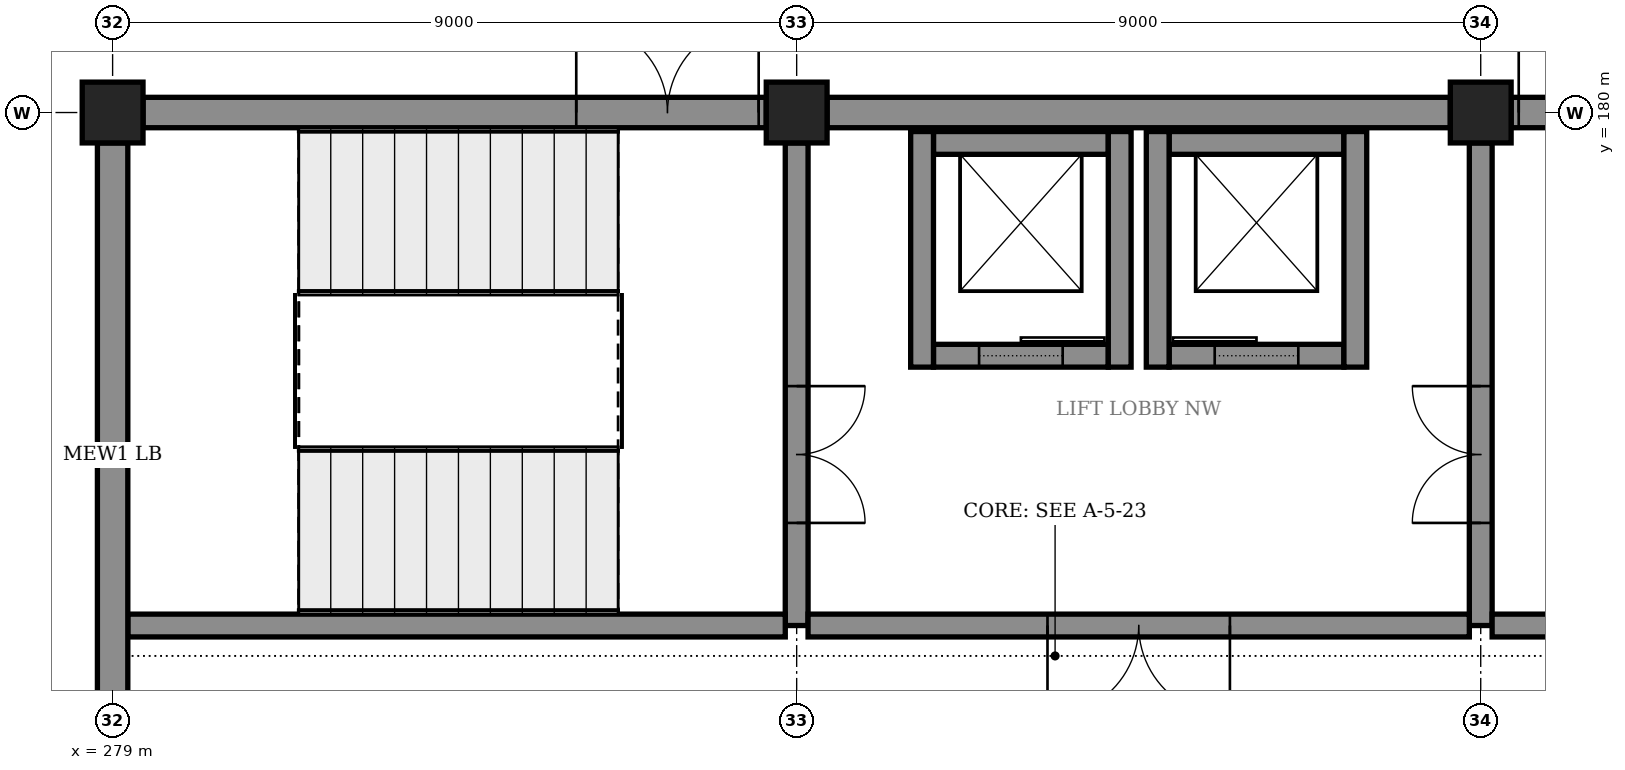
"""IFC4 building model, lengths in metres.
Left out: names, types, materials, properties, quantities, classifications, styles, units other than length and angle.
Written with IfcOpenShell. Run it as: python <this file> out.ifc"""

import sys

from ifc_helpers import new_model, si_unit, direction, frame, frame_2d, origin, origin_2d, place, context, subcontext, project, spatial, rectangle, extrude, element, fill, save


model = new_model("IFC4")
c1 = context("Model", 3, precision=1e-05, world=origin(), true_north=direction((0.0, 1.0)))
c2 = subcontext(c1, "Body", "Model", "MODEL_VIEW")
j1 = project(units=[si_unit("LENGTHUNIT", "METRE"), si_unit("PLANEANGLEUNIT", "RADIAN")], contexts=[c1])
p1 = place(None, origin())
s1 = spatial("IfcSite", under=j1, at=p1, CompositionType="ELEMENT")
p2 = place(p1, origin())
s2 = spatial("IfcBuilding", under=s1, at=p2, CompositionType="ELEMENT")
p3 = place(p2, origin())
s3 = spatial("IfcBuildingStorey", under=s2, at=p3, CompositionType="ELEMENT", Elevation=0.0)
for number, where, z_axis, x_axis in (
    (1, (279.0, 180.0, -0.3), (0.0, 0.0, 1.0), (1.0, 0.0, 0.0)),
    (2, (288.0, 180.0, -0.3), (0.0, 0.0, 1.0), (1.0, 0.0, 0.0)),
    (3, (297.0, 180.0, -0.3), (0.0, 0.0, 1.0), (1.0, 0.0, 0.0)),
):
    element("IfcColumn", number, at=place(p3, frame(where, z_axis=z_axis, x_axis=x_axis)), inside=s3, PredefinedType="COLUMN", context=c2, shape_type="SweptSolid", body=[
        extrude(rectangle(XDim=0.8, YDim=0.8, at=origin_2d()), origin(), (0.0, 0.0, 1.0), 6.3),
    ])
p4 = place(p3, frame((279.4, 180.0, 0.0), z_axis=(0.0, 0.0, 1.0), x_axis=(1.0, 0.0, 0.0)))
e4 = element("IfcWall", 4, at=p4, inside=s3, PredefinedType="STANDARD", context=c2, shape_type="SweptSolid", body=[
    extrude(rectangle(XDim=8.2, YDim=0.4, at=frame_2d((4.1, 0.0))), origin(), (0.0, 0.0, 1.0), 4.82),
])
p5 = place(p4, frame((5.7, 0.0, 0.0)))
e5 = element("IfcOpeningElement", 5, at=p5, cuts=e4, PredefinedType="OPENING", context=c2, shape_type="SweptSolid", body=[
    extrude(rectangle(XDim=2.4, YDim=2.4, at=frame_2d((1.2, 1.2))), frame((0.0, 0.21, 0.0), z_axis=(0.0, -1.0, 0.0), x_axis=(1.0, 0.0, 0.0)), (0.0, 0.0, 1.0), 0.42),
])
p6 = place(p3, frame((288.4, 180.0, 0.0), z_axis=(0.0, 0.0, 1.0), x_axis=(1.0, 0.0, 0.0)))
e6 = element("IfcWall", 6, at=p6, inside=s3, PredefinedType="STANDARD", context=c2, shape_type="SweptSolid", body=[
    extrude(rectangle(XDim=8.2, YDim=0.4, at=frame_2d((4.1, 0.0))), origin(), (0.0, 0.0, 1.0), 4.82),
])
p7 = place(p3, frame((297.4, 180.0, 0.0), z_axis=(0.0, 0.0, 1.0), x_axis=(1.0, 0.0, 0.0)))
e7 = element("IfcWall", 7, at=p7, inside=s3, PredefinedType="STANDARD", context=c2, shape_type="SweptSolid", body=[
    extrude(rectangle(XDim=8.2, YDim=0.4, at=frame_2d((4.1, 0.0))), origin(), (0.0, 0.0, 1.0), 4.82),
])
p8 = place(p7, frame((0.1, 0.0, 0.0)))
e8 = element("IfcOpeningElement", 8, at=p8, cuts=e7, PredefinedType="OPENING", context=c2, shape_type="SweptSolid", body=[
    extrude(rectangle(XDim=2.4, YDim=2.4, at=frame_2d((1.2, 1.2))), frame((0.0, 0.21, 0.0), z_axis=(0.0, -1.0, 0.0), x_axis=(1.0, 0.0, 0.0)), (0.0, 0.0, 1.0), 0.42),
])
p9 = place(p3, frame((279.0, 171.4, 0.0), z_axis=(0.0, 0.0, 1.0), x_axis=(0.0, 1.0, 0.0)))
e9 = element("IfcWall", 9, at=p9, inside=s3, PredefinedType="STANDARD", context=c2, shape_type="SweptSolid", body=[
    extrude(rectangle(XDim=8.2, YDim=0.4, at=frame_2d((4.1, 0.0))), origin(), (0.0, 0.0, 1.0), 4.82),
])
p10 = place(p3, frame((288.0, 173.25, 0.0), z_axis=(0.0, 0.0, 1.0), x_axis=(0.0, 1.0, 0.0)))
e10 = element("IfcWall", 10, at=p10, inside=s3, PredefinedType="SHEAR", context=c2, shape_type="SweptSolid", body=[
    extrude(rectangle(XDim=6.35, YDim=0.3, at=frame_2d((3.175, 0.0))), origin(), (0.0, 0.0, 1.0), 5.72),
])
p11 = place(p10, frame((1.35, 0.0, 0.0)))
e11 = element("IfcOpeningElement", 11, at=p11, cuts=e10, PredefinedType="OPENING", context=c2, shape_type="SweptSolid", body=[
    extrude(rectangle(XDim=1.8, YDim=2.4, at=frame_2d((0.9, 1.2))), frame((0.0, 0.16, 0.0), z_axis=(0.0, -1.0, 0.0), x_axis=(1.0, 0.0, 0.0)), (0.0, 0.0, 1.0), 0.32),
])
p12 = place(p3, frame((297.0, 173.25, 0.0), z_axis=(0.0, 0.0, 1.0), x_axis=(0.0, 1.0, 0.0)))
e12 = element("IfcWall", 12, at=p12, inside=s3, PredefinedType="SHEAR", context=c2, shape_type="SweptSolid", body=[
    extrude(rectangle(XDim=6.35, YDim=0.3, at=frame_2d((3.175, 0.0))), origin(), (0.0, 0.0, 1.0), 5.72),
])
p13 = place(p12, frame((1.35, 0.0, 0.0)))
e13 = element("IfcOpeningElement", 13, at=p13, cuts=e12, PredefinedType="OPENING", context=c2, shape_type="SweptSolid", body=[
    extrude(rectangle(XDim=1.8, YDim=2.4, at=frame_2d((0.9, 1.2))), frame((0.0, 0.16, 0.0), z_axis=(0.0, -1.0, 0.0), x_axis=(1.0, 0.0, 0.0)), (0.0, 0.0, 1.0), 0.32),
])
p14 = place(p3, frame((279.2, 173.25, 0.0), z_axis=(0.0, 0.0, 1.0), x_axis=(1.0, 0.0, 0.0)))
e14 = element("IfcWall", 14, at=p14, inside=s3, PredefinedType="SHEAR", context=c2, shape_type="SweptSolid", body=[
    extrude(rectangle(XDim=8.65, YDim=0.3, at=frame_2d((4.325, 0.0))), origin(), (0.0, 0.0, 1.0), 5.72),
])
p15 = place(p3, frame((288.15, 173.25, 0.0), z_axis=(0.0, 0.0, 1.0), x_axis=(1.0, 0.0, 0.0)))
e15 = element("IfcWall", 15, at=p15, inside=s3, PredefinedType="SHEAR", context=c2, shape_type="SweptSolid", body=[
    extrude(rectangle(XDim=8.7, YDim=0.3, at=frame_2d((4.35, 0.0))), origin(), (0.0, 0.0, 1.0), 5.72),
])
p16 = place(p15, frame((3.15, 0.0, 0.0)))
e16 = element("IfcOpeningElement", 16, at=p16, cuts=e15, PredefinedType="OPENING", context=c2, shape_type="SweptSolid", body=[
    extrude(rectangle(XDim=2.4, YDim=2.4, at=frame_2d((1.2, 1.2))), frame((0.0, 0.16, 0.0), z_axis=(0.0, -1.0, 0.0), x_axis=(1.0, 0.0, 0.0)), (0.0, 0.0, 1.0), 0.32),
])
p17 = place(p3, frame((297.15, 173.25, 0.0), z_axis=(0.0, 0.0, 1.0), x_axis=(1.0, 0.0, 0.0)))
e17 = element("IfcWall", 17, at=p17, inside=s3, PredefinedType="SHEAR", context=c2, shape_type="SweptSolid", body=[
    extrude(rectangle(XDim=8.7, YDim=0.3, at=frame_2d((4.35, 0.0))), origin(), (0.0, 0.0, 1.0), 5.72),
])
for number, where, z_axis, x_axis in (
    (18, (289.65, 176.65, -1.7), (0.0, 0.0, 1.0), (0.0, 1.0, 0.0)),
    (19, (292.25, 176.65, -1.7), (0.0, 0.0, 1.0), (0.0, 1.0, 0.0)),
):
    element("IfcWall", number, at=place(p3, frame(where, z_axis=z_axis, x_axis=x_axis)), inside=s3, PredefinedType="SHEAR", context=c2, shape_type="SweptSolid", body=[
        extrude(rectangle(XDim=3.1, YDim=0.3, at=frame_2d((1.55, 0.0))), origin(), (0.0, 0.0, 1.0), 7.7),
    ])
p18 = place(p3, frame((289.8, 179.6, -1.7), z_axis=(0.0, 0.0, 1.0), x_axis=(1.0, 0.0, 0.0)))
e20 = element("IfcWall", 20, at=p18, inside=s3, PredefinedType="SHEAR", context=c2, shape_type="SweptSolid", body=[
    extrude(rectangle(XDim=2.3, YDim=0.3, at=frame_2d((1.15, 0.0))), origin(), (0.0, 0.0, 1.0), 7.7),
])
p19 = place(p3, frame((289.8, 176.8, -1.7), z_axis=(0.0, 0.0, 1.0), x_axis=(1.0, 0.0, 0.0)))
e21 = element("IfcWall", 21, at=p19, inside=s3, PredefinedType="SHEAR", context=c2, shape_type="SweptSolid", body=[
    extrude(rectangle(XDim=2.3, YDim=0.3, at=frame_2d((1.15, 0.0))), origin(), (0.0, 0.0, 1.0), 7.7),
])
p20 = place(p19, frame((0.6, 0.0, 1.7)))
e22 = element("IfcOpeningElement", 22, at=p20, cuts=e21, PredefinedType="OPENING", context=c2, shape_type="SweptSolid", body=[
    extrude(rectangle(XDim=1.1, YDim=2.2, at=frame_2d((0.55, 1.1))), frame((0.0, 0.16, 0.0), z_axis=(0.0, -1.0, 0.0), x_axis=(1.0, 0.0, 0.0)), (0.0, 0.0, 1.0), 0.32),
])
for number, where, z_axis, x_axis in (
    (23, (292.75, 176.65, -1.7), (0.0, 0.0, 1.0), (0.0, 1.0, 0.0)),
    (24, (295.35, 176.65, -1.7), (0.0, 0.0, 1.0), (0.0, 1.0, 0.0)),
):
    element("IfcWall", number, at=place(p3, frame(where, z_axis=z_axis, x_axis=x_axis)), inside=s3, PredefinedType="SHEAR", context=c2, shape_type="SweptSolid", body=[
        extrude(rectangle(XDim=3.1, YDim=0.3, at=frame_2d((1.55, 0.0))), origin(), (0.0, 0.0, 1.0), 7.7),
    ])
p21 = place(p3, frame((292.9, 179.6, -1.7), z_axis=(0.0, 0.0, 1.0), x_axis=(1.0, 0.0, 0.0)))
e25 = element("IfcWall", 25, at=p21, inside=s3, PredefinedType="SHEAR", context=c2, shape_type="SweptSolid", body=[
    extrude(rectangle(XDim=2.3, YDim=0.3, at=frame_2d((1.15, 0.0))), origin(), (0.0, 0.0, 1.0), 7.7),
])
p22 = place(p3, frame((292.9, 176.8, -1.7), z_axis=(0.0, 0.0, 1.0), x_axis=(1.0, 0.0, 0.0)))
e26 = element("IfcWall", 26, at=p22, inside=s3, PredefinedType="SHEAR", context=c2, shape_type="SweptSolid", body=[
    extrude(rectangle(XDim=2.3, YDim=0.3, at=frame_2d((1.15, 0.0))), origin(), (0.0, 0.0, 1.0), 7.7),
])
p23 = place(p22, frame((0.6, 0.0, 1.7)))
e27 = element("IfcOpeningElement", 27, at=p23, cuts=e26, PredefinedType="OPENING", context=c2, shape_type="SweptSolid", body=[
    extrude(rectangle(XDim=1.1, YDim=2.2, at=frame_2d((0.55, 1.1))), frame((0.0, 0.16, 0.0), z_axis=(0.0, -1.0, 0.0), x_axis=(1.0, 0.0, 0.0)), (0.0, 0.0, 1.0), 0.32),
])
p24 = place(p5, origin())
e28 = element("IfcDoor", 28, at=p24, inside=s3, OperationType="DOUBLE_DOOR_SINGLE_SWING", PredefinedType="DOOR", context=c2, shape_type="SweptSolid", body=[
    extrude(rectangle(XDim=2.4, YDim=2.4, at=frame_2d((1.2, 1.2))), frame((0.0, 0.025, 0.0), z_axis=(0.0, -1.0, 0.0), x_axis=(1.0, 0.0, 0.0)), (0.0, 0.0, 1.0), 0.05),
])
fill(e5, e28)
p25 = place(p8, origin())
e29 = element("IfcDoor", 29, at=p25, inside=s3, OperationType="DOUBLE_DOOR_SINGLE_SWING", PredefinedType="DOOR", context=c2, shape_type="SweptSolid", body=[
    extrude(rectangle(XDim=2.4, YDim=2.4, at=frame_2d((1.2, 1.2))), frame((0.0, 0.025, 0.0), z_axis=(0.0, -1.0, 0.0), x_axis=(1.0, 0.0, 0.0)), (0.0, 0.0, 1.0), 0.05),
])
fill(e8, e29)
p26 = place(p11, frame((1.8, 0.0, 0.0), z_axis=(0.0, 0.0, 1.0), x_axis=(-1.0, 0.0, 0.0)))
e30 = element("IfcDoor", 30, at=p26, inside=s3, OperationType="DOUBLE_DOOR_SINGLE_SWING", PredefinedType="DOOR", context=c2, shape_type="SweptSolid", body=[
    extrude(rectangle(XDim=1.8, YDim=2.4, at=frame_2d((0.9, 1.2))), frame((0.0, 0.025, 0.0), z_axis=(0.0, -1.0, 0.0), x_axis=(1.0, 0.0, 0.0)), (0.0, 0.0, 1.0), 0.05),
])
fill(e11, e30)
p27 = place(p13, origin())
e31 = element("IfcDoor", 31, at=p27, inside=s3, OperationType="DOUBLE_DOOR_SINGLE_SWING", PredefinedType="DOOR", context=c2, shape_type="SweptSolid", body=[
    extrude(rectangle(XDim=1.8, YDim=2.4, at=frame_2d((0.9, 1.2))), frame((0.0, 0.025, 0.0), z_axis=(0.0, -1.0, 0.0), x_axis=(1.0, 0.0, 0.0)), (0.0, 0.0, 1.0), 0.05),
])
fill(e13, e31)
p28 = place(p16, frame((2.4, 0.0, 0.0), z_axis=(0.0, 0.0, 1.0), x_axis=(-1.0, 0.0, 0.0)))
e32 = element("IfcDoor", 32, at=p28, inside=s3, OperationType="DOUBLE_DOOR_SINGLE_SWING", PredefinedType="DOOR", context=c2, shape_type="SweptSolid", body=[
    extrude(rectangle(XDim=2.4, YDim=2.4, at=frame_2d((1.2, 1.2))), frame((0.0, 0.025, 0.0), z_axis=(0.0, -1.0, 0.0), x_axis=(1.0, 0.0, 0.0)), (0.0, 0.0, 1.0), 0.05),
])
fill(e16, e32)
p29 = place(p20, origin())
e33 = element("IfcDoor", 33, at=p29, inside=s3, OperationType="SLIDING_TO_RIGHT", PredefinedType="DOOR", context=c2, shape_type="SweptSolid", body=[
    extrude(rectangle(XDim=1.1, YDim=2.2, at=frame_2d((0.55, 1.1))), frame((0.0, 0.025, 0.0), z_axis=(0.0, -1.0, 0.0), x_axis=(1.0, 0.0, 0.0)), (0.0, 0.0, 1.0), 0.05),
])
fill(e22, e33)
p30 = place(p23, origin())
e34 = element("IfcDoor", 34, at=p30, inside=s3, OperationType="SLIDING_TO_LEFT", PredefinedType="DOOR", context=c2, shape_type="SweptSolid", body=[
    extrude(rectangle(XDim=1.1, YDim=2.2, at=frame_2d((0.55, 1.1))), frame((0.0, 0.025, 0.0), z_axis=(0.0, -1.0, 0.0), x_axis=(1.0, 0.0, 0.0)), (0.0, 0.0, 1.0), 0.05),
])
fill(e27, e34)
save(model, sys.argv[1])
